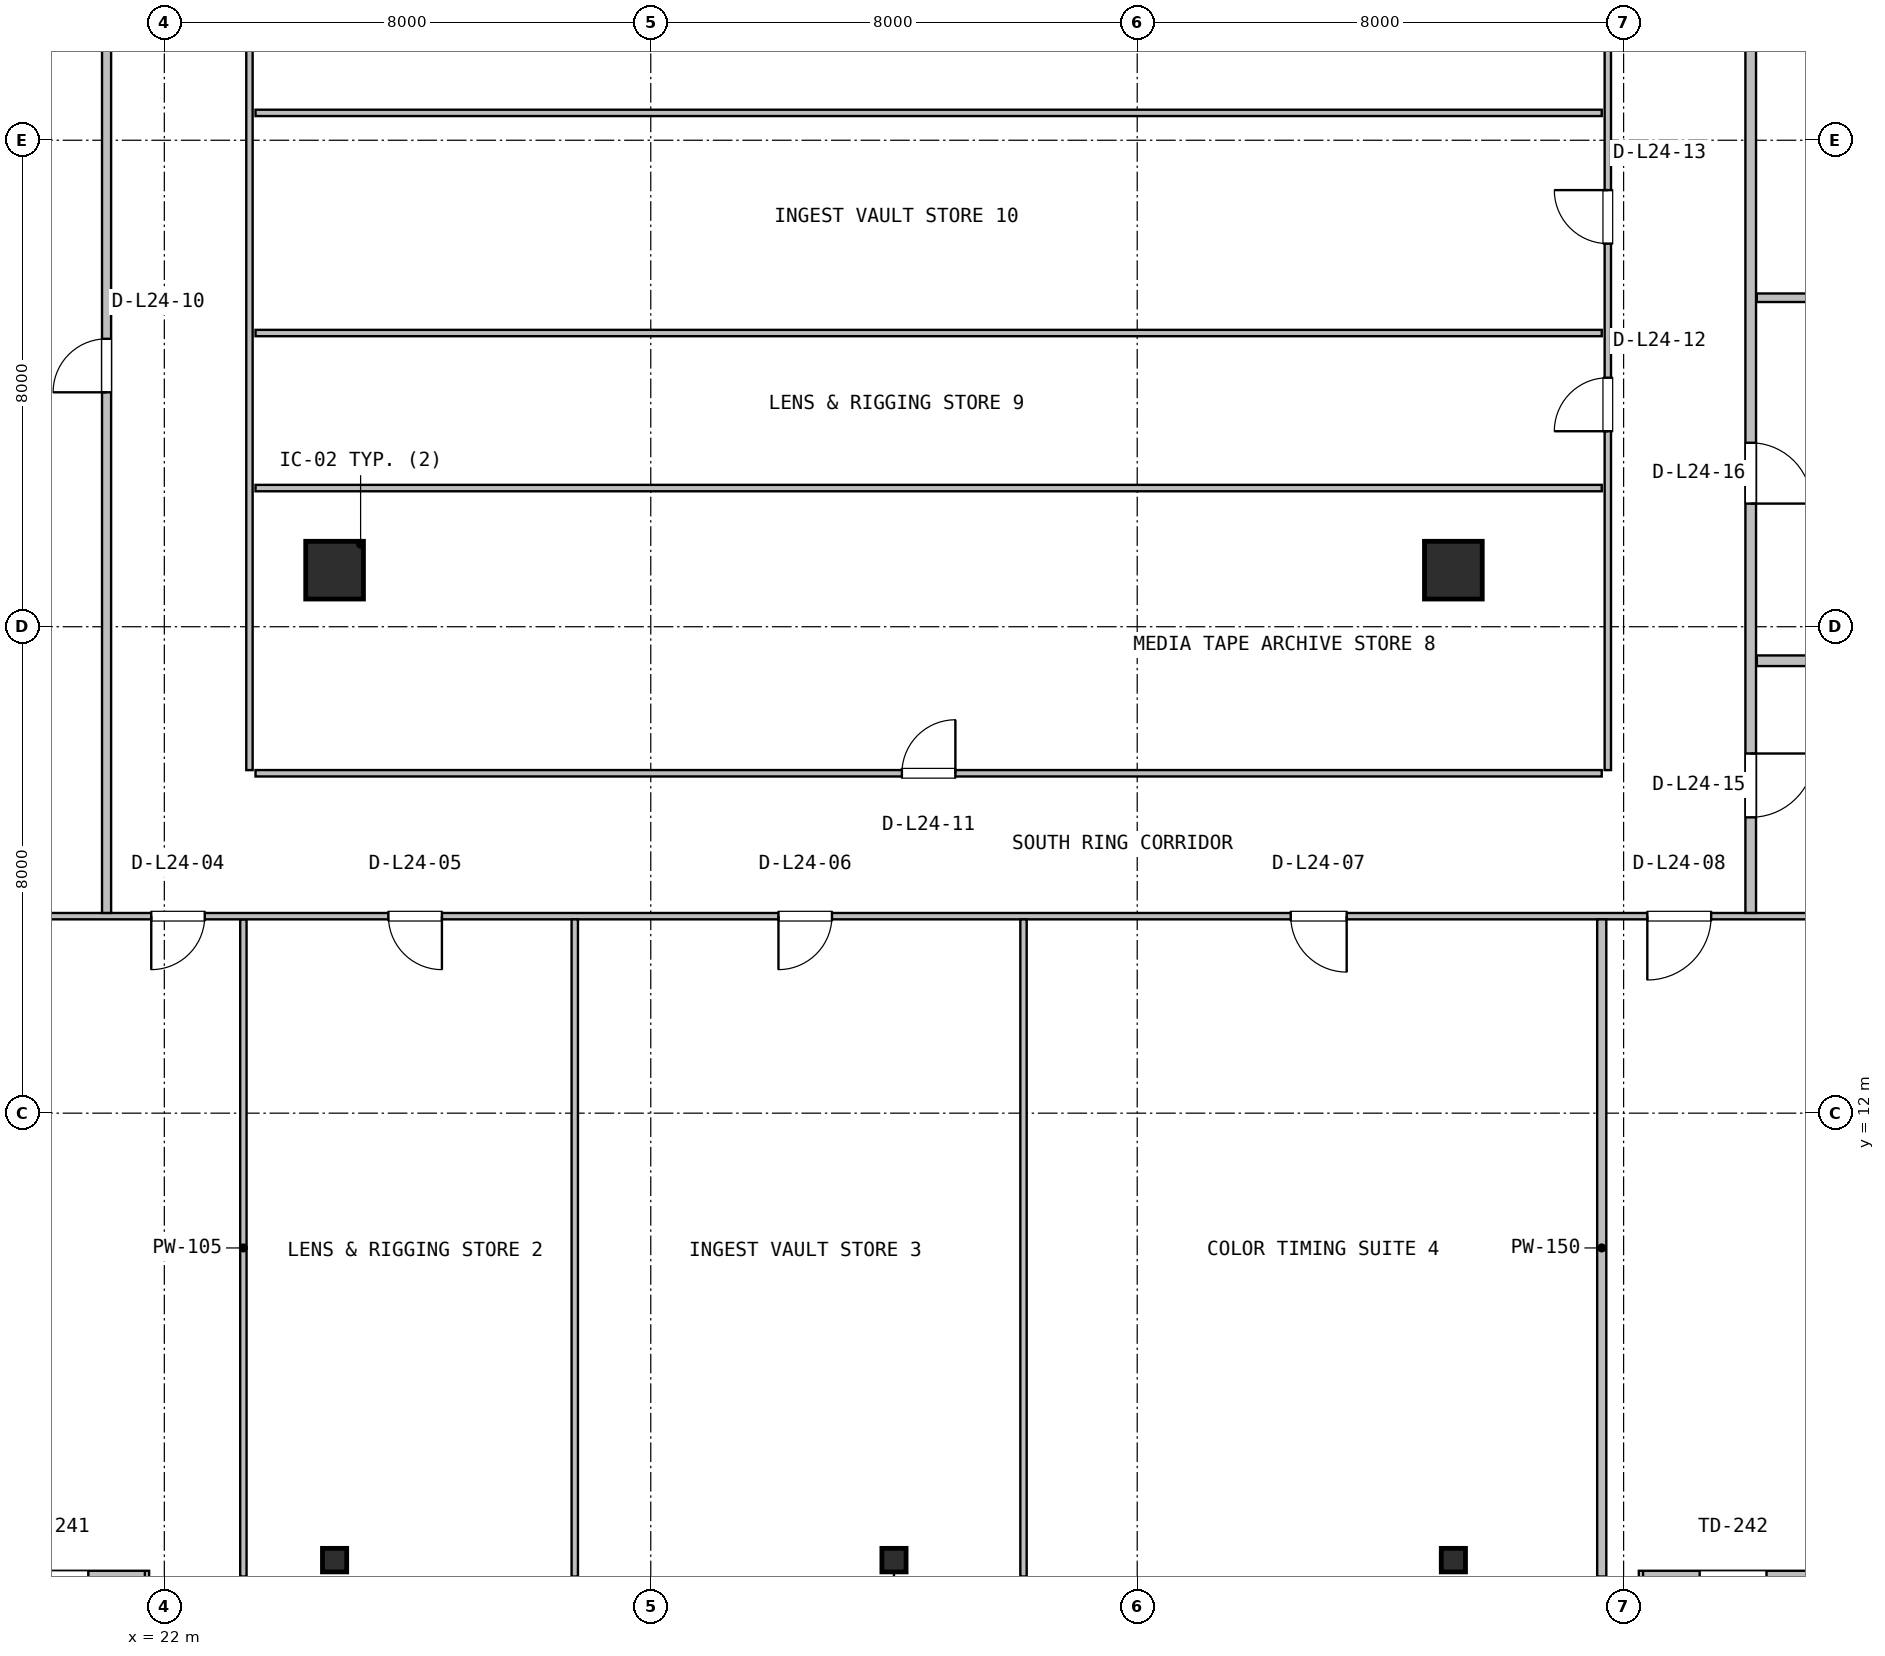
"""IFC4 building model, lengths in metres.
Left out: names, types, materials, properties, quantities, classifications, styles, units other than length and angle.
Written with IfcOpenShell. Run it as: python <this file> out.ifc"""

import sys

from ifc_helpers import new_model, si_unit, direction, frame, frame_2d, origin, origin_2d, place, context, subcontext, project, spatial, rectangle, i_section, extrude, source, transform, mapped, element, fill, save


model = new_model("IFC4")
c1 = context("Model", 3, precision=1e-05, world=origin(), true_north=direction((0.0, 1.0)))
c2 = subcontext(c1, "Body", "Model", "MODEL_VIEW")
j1 = project(units=[si_unit("LENGTHUNIT", "METRE"), si_unit("PLANEANGLEUNIT", "RADIAN")], contexts=[c1])
p1 = place(None, origin())
s1 = spatial("IfcSite", under=j1, at=p1, CompositionType="ELEMENT")
p2 = place(p1, origin())
s2 = spatial("IfcBuilding", under=s1, at=p2, CompositionType="ELEMENT")
p3 = place(p2, frame((0.0, 0.0, 103.0)))
s3 = spatial("IfcBuildingStorey", under=s2, at=p3, CompositionType="ELEMENT", Elevation=103.0)
m1 = source(origin(), c2, "Body", "SweptSolid", [
    extrude(i_section(OverallWidth=0.398, OverallDepth=0.387, WebThickness=0.021, FlangeThickness=0.033, FilletRadius=0.018, at=origin_2d()), origin(), (0.0, 0.0, 1.0), 3.8),
])
for number, where, z_axis, x_axis in (
    (1, (24.8, 4.65, 0.0), (0.0, 0.0, 1.0), (1.0, 0.0, 0.0)),
    (2, (34.0, 4.65, 0.0), (0.0, 0.0, 1.0), (1.0, 0.0, 0.0)),
    (3, (43.2, 4.65, 0.0), (0.0, 0.0, 1.0), (1.0, 0.0, 0.0)),
):
    element("IfcColumn", number, at=place(p3, frame(where, z_axis=z_axis, x_axis=x_axis)), inside=s3, PredefinedType="COLUMN", context=c2, shape_type="MappedRepresentation", body=[
        mapped(m1, transform((0.0, 0.0, 0.0), x_axis=(1.0, 0.0, 0.0), y_axis=(0.0, 1.0, 0.0), z_axis=(0.0, 0.0, 1.0), scale=1.0)),
    ])
m2 = source(origin(), c2, "Body", "SweptSolid", [
    extrude(rectangle(XDim=0.95, YDim=0.95, at=origin_2d()), origin(), (0.0, 0.0, 1.0), 3.8),
])
for number, where, z_axis, x_axis in (
    (4, (24.8, 20.93, 0.0), (0.0, 0.0, 1.0), (1.0, 0.0, 0.0)),
    (5, (43.2, 20.93, 0.0), (0.0, 0.0, 1.0), (1.0, 0.0, 0.0)),
):
    element("IfcColumn", number, at=place(p3, frame(where, z_axis=z_axis, x_axis=x_axis)), inside=s3, PredefinedType="COLUMN", context=c2, shape_type="MappedRepresentation", body=[
        mapped(m2, transform((0.0, 0.0, 0.0), x_axis=(1.0, 0.0, 0.0), y_axis=(0.0, 1.0, 0.0), z_axis=(0.0, 0.0, 1.0), scale=1.0)),
    ])
p4 = place(p3, frame((18.65, 4.35, 0.0), z_axis=(0.0, 0.0, 1.0), x_axis=(1.0, 0.0, 0.0)))
e6 = element("IfcWall", 6, at=p4, inside=s3, PredefinedType="SOLIDWALL", context=c2, shape_type="SweptSolid", body=[
    extrude(rectangle(XDim=3.1, YDim=0.25, at=frame_2d((1.55, 0.0))), origin(), (0.0, 0.0, 1.0), 3.53),
])
p5 = place(p4, frame((1.0, 0.0, 0.0)))
e7 = element("IfcOpeningElement", 7, at=p5, cuts=e6, PredefinedType="OPENING", context=c2, shape_type="SweptSolid", body=[
    extrude(rectangle(XDim=1.1, YDim=2.15, at=frame_2d((0.55, 1.075))), frame((0.0, 0.135, 0.0), z_axis=(0.0, -1.0, 0.0), x_axis=(1.0, 0.0, 0.0)), (0.0, 0.0, 1.0), 0.27),
])
p6 = place(p3, frame((46.25, 4.35, 0.0), z_axis=(0.0, 0.0, 1.0), x_axis=(1.0, 0.0, 0.0)))
e8 = element("IfcWall", 8, at=p6, inside=s3, PredefinedType="SOLIDWALL", context=c2, shape_type="SweptSolid", body=[
    extrude(rectangle(XDim=3.1, YDim=0.25, at=frame_2d((1.55, 0.0))), origin(), (0.0, 0.0, 1.0), 3.53),
])
p7 = place(p6, frame((1.0, 0.0, 0.0)))
e9 = element("IfcOpeningElement", 9, at=p7, cuts=e8, PredefinedType="OPENING", context=c2, shape_type="SweptSolid", body=[
    extrude(rectangle(XDim=1.1, YDim=2.15, at=frame_2d((0.55, 1.075))), frame((0.0, 0.135, 0.0), z_axis=(0.0, -1.0, 0.0), x_axis=(1.0, 0.0, 0.0)), (0.0, 0.0, 1.0), 0.27),
])
p8 = place(p3, frame((23.3, 4.38, 0.0), z_axis=(0.0, 0.0, 1.0), x_axis=(0.0, 1.0, 0.0)))
e10 = element("IfcWall", 10, at=p8, inside=s3, PredefinedType="PARTITIONING", context=c2, shape_type="SweptSolid", body=[
    extrude(rectangle(XDim=10.808, YDim=0.105, at=frame_2d((5.404, 0.0))), origin(), (0.0, 0.0, 1.0), 3.108),
])
p9 = place(p3, frame((4.68, 15.24, 0.0), z_axis=(0.0, 0.0, 1.0), x_axis=(1.0, 0.0, 0.0)))
e11 = element("IfcWall", 11, at=p9, inside=s3, PredefinedType="PARTITIONING", context=c2, shape_type="SweptSolid", body=[
    extrude(rectangle(XDim=58.64, YDim=0.105, at=frame_2d((29.32, 0.0))), origin(), (0.0, 0.0, 1.0), 2.83),
])
p10 = place(p9, frame((17.105, 0.0, 0.0)))
e12 = element("IfcOpeningElement", 12, at=p10, cuts=e11, PredefinedType="OPENING", context=c2, shape_type="SweptSolid", body=[
    extrude(rectangle(XDim=0.88, YDim=2.06, at=frame_2d((0.44, 1.03))), frame((0.0, 0.062, 0.0), z_axis=(0.0, -1.0, 0.0), x_axis=(1.0, 0.0, 0.0)), (0.0, 0.0, 1.0), 0.125),
])
p11 = place(p9, frame((21.005, 0.0, 0.0)))
e13 = element("IfcOpeningElement", 13, at=p11, cuts=e11, PredefinedType="OPENING", context=c2, shape_type="SweptSolid", body=[
    extrude(rectangle(XDim=0.88, YDim=2.06, at=frame_2d((0.44, 1.03))), frame((0.0, 0.062, 0.0), z_axis=(0.0, -1.0, 0.0), x_axis=(1.0, 0.0, 0.0)), (0.0, 0.0, 1.0), 0.125),
])
p12 = place(p9, frame((27.42, 0.0, 0.0)))
e14 = element("IfcOpeningElement", 14, at=p12, cuts=e11, PredefinedType="OPENING", context=c2, shape_type="SweptSolid", body=[
    extrude(rectangle(XDim=0.88, YDim=2.06, at=frame_2d((0.44, 1.03))), frame((0.0, 0.062, 0.0), z_axis=(0.0, -1.0, 0.0), x_axis=(1.0, 0.0, 0.0)), (0.0, 0.0, 1.0), 0.125),
])
p13 = place(p9, frame((35.845, 0.0, 0.0)))
e15 = element("IfcOpeningElement", 15, at=p13, cuts=e11, PredefinedType="OPENING", context=c2, shape_type="SweptSolid", body=[
    extrude(rectangle(XDim=0.92, YDim=2.08, at=frame_2d((0.46, 1.04))), frame((0.0, 0.062, 0.0), z_axis=(0.0, -1.0, 0.0), x_axis=(1.0, 0.0, 0.0)), (0.0, 0.0, 1.0), 0.125),
])
p14 = place(p9, frame((41.71, 0.0, 0.0)))
e16 = element("IfcOpeningElement", 16, at=p14, cuts=e11, PredefinedType="OPENING", context=c2, shape_type="SweptSolid", body=[
    extrude(rectangle(XDim=1.05, YDim=2.1, at=frame_2d((0.525, 1.05))), frame((0.0, 0.062, 0.0), z_axis=(0.0, -1.0, 0.0), x_axis=(1.0, 0.0, 0.0)), (0.0, 0.0, 1.0), 0.125),
])
for number, where, z_axis, x_axis in (
    (17, (28.75, 4.38, 0.0), (0.0, 0.0, 1.0), (0.0, 1.0, 0.0)),
    (18, (36.13, 4.38, 0.0), (0.0, 0.0, 1.0), (0.0, 1.0, 0.0)),
):
    element("IfcWall", number, at=place(p3, frame(where, z_axis=z_axis, x_axis=x_axis)), inside=s3, PredefinedType="PARTITIONING", context=c2, shape_type="SweptSolid", body=[
        extrude(rectangle(XDim=10.808, YDim=0.105, at=frame_2d((5.404, 0.0))), origin(), (0.0, 0.0, 1.0), 3.108),
    ])
p15 = place(p3, frame((45.64, 4.38, 0.0), z_axis=(0.0, 0.0, 1.0), x_axis=(0.0, 1.0, 0.0)))
e19 = element("IfcWall", 19, at=p15, inside=s3, PredefinedType="PARTITIONING", context=c2, shape_type="SweptSolid", body=[
    extrude(rectangle(XDim=10.808, YDim=0.15, at=frame_2d((5.404, 0.0))), origin(), (0.0, 0.0, 1.0), 3.108),
])
p16 = place(p3, frame((21.05, 15.293, 0.0), z_axis=(0.0, 0.0, 1.0), x_axis=(0.0, 1.0, 0.0)))
e20 = element("IfcWall", 20, at=p16, inside=s3, PredefinedType="PARTITIONING", context=c2, shape_type="SweptSolid", body=[
    extrude(rectangle(XDim=17.987, YDim=0.15, at=frame_2d((8.994, 0.0))), origin(), (0.0, 0.0, 1.0), 3.222),
])
p17 = place(p16, frame((8.562, 0.0, 0.0)))
e21 = element("IfcOpeningElement", 21, at=p17, cuts=e20, PredefinedType="OPENING", context=c2, shape_type="SweptSolid", body=[
    extrude(rectangle(XDim=0.88, YDim=2.06, at=frame_2d((0.44, 1.03))), frame((0.0, 0.085, 0.0), z_axis=(0.0, -1.0, 0.0), x_axis=(1.0, 0.0, 0.0)), (0.0, 0.0, 1.0), 0.17),
])
p18 = place(p3, frame((23.5, 17.59, 0.0), z_axis=(0.0, 0.0, 1.0), x_axis=(1.0, 0.0, 0.0)))
e22 = element("IfcWall", 22, at=p18, inside=s3, PredefinedType="PARTITIONING", context=c2, shape_type="SweptSolid", body=[
    extrude(rectangle(XDim=22.14, YDim=0.105, at=frame_2d((11.07, 0.0))), origin(), (0.0, 0.0, 1.0), 2.83),
])
p19 = place(p18, frame((10.63, 0.0, 0.0)))
e23 = element("IfcOpeningElement", 23, at=p19, cuts=e22, PredefinedType="OPENING", context=c2, shape_type="SweptSolid", body=[
    extrude(rectangle(XDim=0.88, YDim=2.06, at=frame_2d((0.44, 1.03))), frame((0.0, 0.062, 0.0), z_axis=(0.0, -1.0, 0.0), x_axis=(1.0, 0.0, 0.0)), (0.0, 0.0, 1.0), 0.125),
])
p20 = place(p3, frame((45.74, 17.642, 0.0), z_axis=(0.0, 0.0, 1.0), x_axis=(0.0, 1.0, 0.0)))
e24 = element("IfcWall", 24, at=p20, inside=s3, PredefinedType="PARTITIONING", context=c2, shape_type="SweptSolid", body=[
    extrude(rectangle(XDim=15.633, YDim=0.105, at=frame_2d((7.816, 0.0))), origin(), (0.0, 0.0, 1.0), 3.222),
])
p21 = place(p20, frame((5.573, 0.0, 0.0)))
e25 = element("IfcOpeningElement", 25, at=p21, cuts=e24, PredefinedType="OPENING", context=c2, shape_type="SweptSolid", body=[
    extrude(rectangle(XDim=0.88, YDim=2.06, at=frame_2d((0.44, 1.03))), frame((0.0, 0.062, 0.0), z_axis=(0.0, -1.0, 0.0), x_axis=(1.0, 0.0, 0.0)), (0.0, 0.0, 1.0), 0.125),
])
p22 = place(p20, frame((8.658, 0.0, 0.0)))
e26 = element("IfcOpeningElement", 26, at=p22, cuts=e24, PredefinedType="OPENING", context=c2, shape_type="SweptSolid", body=[
    extrude(rectangle(XDim=0.88, YDim=2.06, at=frame_2d((0.44, 1.03))), frame((0.0, 0.062, 0.0), z_axis=(0.0, -1.0, 0.0), x_axis=(1.0, 0.0, 0.0)), (0.0, 0.0, 1.0), 0.125),
])
p23 = place(p3, frame((23.5, 22.28, 0.0), z_axis=(0.0, 0.0, 1.0), x_axis=(1.0, 0.0, 0.0)))
e27 = element("IfcWall", 27, at=p23, inside=s3, PredefinedType="PARTITIONING", context=c2, shape_type="SweptSolid", body=[
    extrude(rectangle(XDim=22.14, YDim=0.105, at=frame_2d((11.07, 0.0))), origin(), (0.0, 0.0, 1.0), 2.83),
])
p24 = place(p3, frame((23.4, 17.642, 0.0), z_axis=(0.0, 0.0, 1.0), x_axis=(0.0, 1.0, 0.0)))
e28 = element("IfcWall", 28, at=p24, inside=s3, PredefinedType="PARTITIONING", context=c2, shape_type="SweptSolid", body=[
    extrude(rectangle(XDim=15.633, YDim=0.105, at=frame_2d((7.816, 0.0))), origin(), (0.0, 0.0, 1.0), 3.222),
])
for number, where, z_axis, x_axis in (
    (29, (23.5, 24.83, 0.0), (0.0, 0.0, 1.0), (1.0, 0.0, 0.0)),
    (30, (23.5, 28.45, 0.0), (0.0, 0.0, 1.0), (1.0, 0.0, 0.0)),
):
    element("IfcWall", number, at=place(p3, frame(where, z_axis=z_axis, x_axis=x_axis)), inside=s3, PredefinedType="PARTITIONING", context=c2, shape_type="SweptSolid", body=[
        extrude(rectangle(XDim=22.14, YDim=0.105, at=frame_2d((11.07, 0.0))), origin(), (0.0, 0.0, 1.0), 2.83),
    ])
p25 = place(p3, frame((48.19, 19.44, 0.0), z_axis=(0.0, 0.0, 1.0), x_axis=(1.0, 0.0, 0.0)))
e31 = element("IfcWall", 31, at=p25, inside=s3, PredefinedType="PARTITIONING", context=c2, shape_type="SweptSolid", body=[
    extrude(rectangle(XDim=15.13, YDim=0.175, at=frame_2d((7.565, 0.0))), origin(), (0.0, 0.0, 1.0), 3.108),
])
p26 = place(p3, frame((48.09, 15.293, 0.0), z_axis=(0.0, 0.0, 1.0), x_axis=(0.0, 1.0, 0.0)))
e32 = element("IfcWall", 32, at=p26, inside=s3, PredefinedType="PARTITIONING", context=c2, shape_type="SweptSolid", body=[
    extrude(rectangle(XDim=17.982, YDim=0.175, at=frame_2d((8.991, 0.0))), origin(), (0.0, 0.0, 1.0), 3.222),
])
p27 = place(p26, frame((1.572, 0.0, 0.0)))
e33 = element("IfcOpeningElement", 33, at=p27, cuts=e32, PredefinedType="OPENING", context=c2, shape_type="SweptSolid", body=[
    extrude(rectangle(XDim=1.05, YDim=2.1, at=frame_2d((0.525, 1.05))), frame((0.0, 0.098, 0.0), z_axis=(0.0, -1.0, 0.0), x_axis=(1.0, 0.0, 0.0)), (0.0, 0.0, 1.0), 0.195),
])
p28 = place(p26, frame((6.732, 0.0, 0.0)))
e34 = element("IfcOpeningElement", 34, at=p28, cuts=e32, PredefinedType="OPENING", context=c2, shape_type="SweptSolid", body=[
    extrude(rectangle(XDim=1.0, YDim=2.1, at=frame_2d((0.5, 1.05))), frame((0.0, 0.098, 0.0), z_axis=(0.0, -1.0, 0.0), x_axis=(1.0, 0.0, 0.0)), (0.0, 0.0, 1.0), 0.195),
])
p29 = place(p3, frame((48.19, 25.41, 0.0), z_axis=(0.0, 0.0, 1.0), x_axis=(1.0, 0.0, 0.0)))
e35 = element("IfcWall", 35, at=p29, inside=s3, PredefinedType="PARTITIONING", context=c2, shape_type="SweptSolid", body=[
    extrude(rectangle(XDim=15.13, YDim=0.14, at=frame_2d((7.565, 0.0))), origin(), (0.0, 0.0, 1.0), 3.108),
])
m3 = source(origin(), c2, "Body", "SweptSolid", [
    extrude(rectangle(XDim=0.88, YDim=2.06, at=frame_2d((0.44, 1.03))), frame((0.0, 0.025, 0.0), z_axis=(0.0, -1.0, 0.0), x_axis=(1.0, 0.0, 0.0)), (0.0, 0.0, 1.0), 0.05),
])
p30 = place(p10, frame((0.88, 0.0, 0.0), z_axis=(0.0, 0.0, 1.0), x_axis=(-1.0, 0.0, 0.0)))
e36 = element("IfcDoor", 36, at=p30, inside=s3, OperationType="SINGLE_SWING_LEFT", PredefinedType="DOOR", context=c2, shape_type="MappedRepresentation", body=[
    mapped(m3, transform((0.0, 0.0, 0.0), x_axis=(1.0, 0.0, 0.0), y_axis=(0.0, 1.0, 0.0), z_axis=(0.0, 0.0, 1.0), scale=1.0)),
])
fill(e12, e36)
p31 = place(p11, frame((0.88, 0.0, 0.0), z_axis=(0.0, 0.0, 1.0), x_axis=(-1.0, 0.0, 0.0)))
e37 = element("IfcDoor", 37, at=p31, inside=s3, OperationType="SINGLE_SWING_RIGHT", PredefinedType="DOOR", context=c2, shape_type="MappedRepresentation", body=[
    mapped(m3, transform((0.0, 0.0, 0.0), x_axis=(1.0, 0.0, 0.0), y_axis=(0.0, 1.0, 0.0), z_axis=(0.0, 0.0, 1.0), scale=1.0)),
])
fill(e13, e37)
p32 = place(p12, frame((0.88, 0.0, 0.0), z_axis=(0.0, 0.0, 1.0), x_axis=(-1.0, 0.0, 0.0)))
e38 = element("IfcDoor", 38, at=p32, inside=s3, OperationType="SINGLE_SWING_LEFT", PredefinedType="DOOR", context=c2, shape_type="MappedRepresentation", body=[
    mapped(m3, transform((0.0, 0.0, 0.0), x_axis=(1.0, 0.0, 0.0), y_axis=(0.0, 1.0, 0.0), z_axis=(0.0, 0.0, 1.0), scale=1.0)),
])
fill(e14, e38)
m4 = source(origin(), c2, "Body", "SweptSolid", [
    extrude(rectangle(XDim=0.92, YDim=2.08, at=frame_2d((0.46, 1.04))), frame((0.0, 0.025, 0.0), z_axis=(0.0, -1.0, 0.0), x_axis=(1.0, 0.0, 0.0)), (0.0, 0.0, 1.0), 0.05),
])
p33 = place(p13, frame((0.92, 0.0, 0.0), z_axis=(0.0, 0.0, 1.0), x_axis=(-1.0, 0.0, 0.0)))
e39 = element("IfcDoor", 39, at=p33, inside=s3, OperationType="SINGLE_SWING_RIGHT", PredefinedType="DOOR", context=c2, shape_type="MappedRepresentation", body=[
    mapped(m4, transform((0.0, 0.0, 0.0), x_axis=(1.0, 0.0, 0.0), y_axis=(0.0, 1.0, 0.0), z_axis=(0.0, 0.0, 1.0), scale=1.0)),
])
fill(e15, e39)
m5 = source(origin(), c2, "Body", "SweptSolid", [
    extrude(rectangle(XDim=1.05, YDim=2.1, at=frame_2d((0.525, 1.05))), frame((0.0, 0.025, 0.0), z_axis=(0.0, -1.0, 0.0), x_axis=(1.0, 0.0, 0.0)), (0.0, 0.0, 1.0), 0.05),
])
p34 = place(p14, frame((1.05, 0.0, 0.0), z_axis=(0.0, 0.0, 1.0), x_axis=(-1.0, 0.0, 0.0)))
e40 = element("IfcDoor", 40, at=p34, inside=s3, OperationType="SINGLE_SWING_LEFT", PredefinedType="DOOR", context=c2, shape_type="MappedRepresentation", body=[
    mapped(m5, transform((0.0, 0.0, 0.0), x_axis=(1.0, 0.0, 0.0), y_axis=(0.0, 1.0, 0.0), z_axis=(0.0, 0.0, 1.0), scale=1.0)),
])
fill(e16, e40)
p35 = place(p17, origin())
e41 = element("IfcDoor", 41, at=p35, inside=s3, OperationType="SINGLE_SWING_LEFT", PredefinedType="DOOR", context=c2, shape_type="MappedRepresentation", body=[
    mapped(m3, transform((0.0, 0.0, 0.0), x_axis=(1.0, 0.0, 0.0), y_axis=(0.0, 1.0, 0.0), z_axis=(0.0, 0.0, 1.0), scale=1.0)),
])
fill(e21, e41)
p36 = place(p19, origin())
e42 = element("IfcDoor", 42, at=p36, inside=s3, OperationType="SINGLE_SWING_RIGHT", PredefinedType="DOOR", context=c2, shape_type="MappedRepresentation", body=[
    mapped(m3, transform((0.0, 0.0, 0.0), x_axis=(1.0, 0.0, 0.0), y_axis=(0.0, 1.0, 0.0), z_axis=(0.0, 0.0, 1.0), scale=1.0)),
])
fill(e23, e42)
p37 = place(p21, origin())
e43 = element("IfcDoor", 43, at=p37, inside=s3, OperationType="SINGLE_SWING_LEFT", PredefinedType="DOOR", context=c2, shape_type="MappedRepresentation", body=[
    mapped(m3, transform((0.0, 0.0, 0.0), x_axis=(1.0, 0.0, 0.0), y_axis=(0.0, 1.0, 0.0), z_axis=(0.0, 0.0, 1.0), scale=1.0)),
])
fill(e25, e43)
p38 = place(p22, origin())
e44 = element("IfcDoor", 44, at=p38, inside=s3, OperationType="SINGLE_SWING_RIGHT", PredefinedType="DOOR", context=c2, shape_type="MappedRepresentation", body=[
    mapped(m3, transform((0.0, 0.0, 0.0), x_axis=(1.0, 0.0, 0.0), y_axis=(0.0, 1.0, 0.0), z_axis=(0.0, 0.0, 1.0), scale=1.0)),
])
fill(e26, e44)
p39 = place(p27, frame((1.05, 0.0, 0.0), z_axis=(0.0, 0.0, 1.0), x_axis=(-1.0, 0.0, 0.0)))
e45 = element("IfcDoor", 45, at=p39, inside=s3, OperationType="SINGLE_SWING_RIGHT", PredefinedType="DOOR", context=c2, shape_type="MappedRepresentation", body=[
    mapped(m5, transform((0.0, 0.0, 0.0), x_axis=(1.0, 0.0, 0.0), y_axis=(0.0, 1.0, 0.0), z_axis=(0.0, 0.0, 1.0), scale=1.0)),
])
fill(e33, e45)
m6 = source(origin(), c2, "Body", "SweptSolid", [
    extrude(rectangle(XDim=1.0, YDim=2.1, at=frame_2d((0.5, 1.05))), frame((0.0, 0.025, 0.0), z_axis=(0.0, -1.0, 0.0), x_axis=(1.0, 0.0, 0.0)), (0.0, 0.0, 1.0), 0.05),
])
p40 = place(p28, frame((1.0, 0.0, 0.0), z_axis=(0.0, 0.0, 1.0), x_axis=(-1.0, 0.0, 0.0)))
e46 = element("IfcDoor", 46, at=p40, inside=s3, OperationType="SINGLE_SWING_LEFT", PredefinedType="DOOR", context=c2, shape_type="MappedRepresentation", body=[
    mapped(m6, transform((0.0, 0.0, 0.0), x_axis=(1.0, 0.0, 0.0), y_axis=(0.0, 1.0, 0.0), z_axis=(0.0, 0.0, 1.0), scale=1.0)),
])
fill(e34, e46)
save(model, sys.argv[1])
